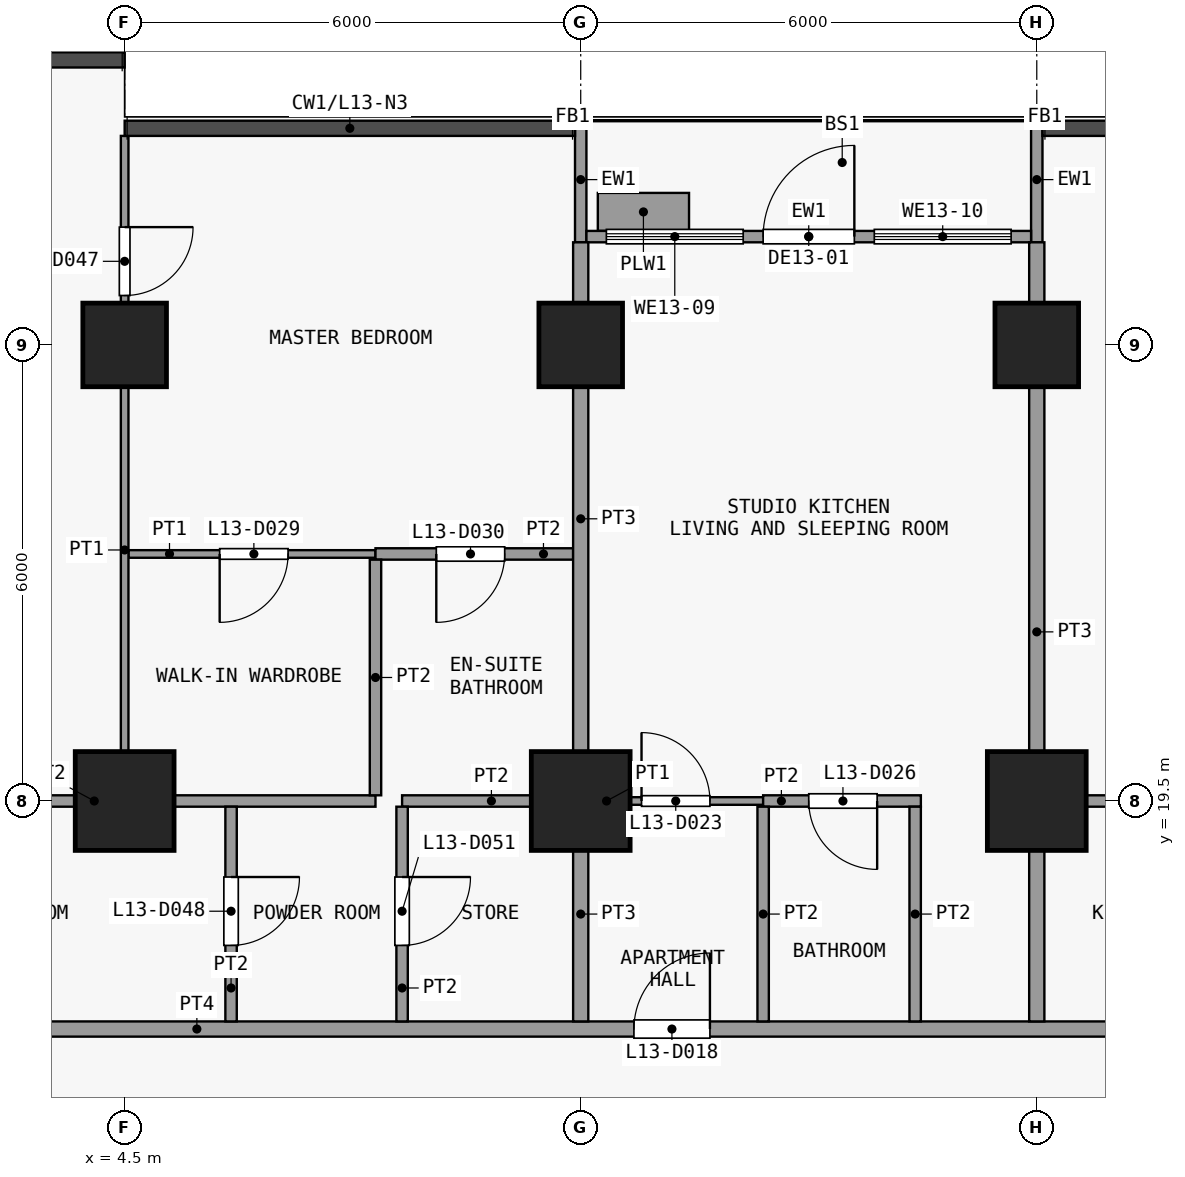
"""IFC4 building model, lengths in metres.
Left out: names, types, materials, properties, quantities, classifications, styles, units other than length and angle.
Written with IfcOpenShell. Run it as: python <this file> out.ifc"""

import sys

from ifc_helpers import new_model, si_unit, direction, frame, frame_2d, origin, origin_2d, place, context, subcontext, project, spatial, rectangle, extrude, element, fill, save


model = new_model("IFC4")
c1 = context("Model", 3, precision=1e-05, world=origin(), true_north=direction((0.0, 1.0)))
c2 = subcontext(c1, "Body", "Model", "MODEL_VIEW")
j1 = project(units=[si_unit("LENGTHUNIT", "METRE"), si_unit("PLANEANGLEUNIT", "RADIAN")], contexts=[c1])
p1 = place(None, origin())
s1 = spatial("IfcSite", under=j1, at=p1, CompositionType="ELEMENT")
p2 = place(p1, origin())
s2 = spatial("IfcBuilding", under=s1, at=p2, CompositionType="ELEMENT")
p3 = place(p2, frame((0.0, 0.0, 57.7)))
s3 = spatial("IfcBuildingStorey", under=s2, at=p3, CompositionType="ELEMENT", Elevation=57.7)
p4 = place(p3, frame((4.5, 19.5, 0.0), z_axis=(0.0, 0.0, 1.0), x_axis=(1.0, 0.0, 0.0)))
e1 = element("IfcColumn", 1, at=p4, inside=s3, PredefinedType="COLUMN", context=c2, shape_type="SweptSolid", body=[
    extrude(rectangle(XDim=1.3, YDim=1.3, at=origin_2d()), origin(), (0.0, 0.0, 1.0), 3.6),
])
p5 = place(p3, frame((4.5, 25.5, 0.0), z_axis=(0.0, 0.0, 1.0), x_axis=(1.0, 0.0, 0.0)))
e2 = element("IfcColumn", 2, at=p5, inside=s3, PredefinedType="COLUMN", context=c2, shape_type="SweptSolid", body=[
    extrude(rectangle(XDim=1.1, YDim=1.1, at=origin_2d()), origin(), (0.0, 0.0, 1.0), 3.6),
])
p6 = place(p3, frame((10.5, 19.5, 0.0), z_axis=(0.0, 0.0, 1.0), x_axis=(1.0, 0.0, 0.0)))
e3 = element("IfcColumn", 3, at=p6, inside=s3, PredefinedType="COLUMN", context=c2, shape_type="SweptSolid", body=[
    extrude(rectangle(XDim=1.3, YDim=1.3, at=origin_2d()), origin(), (0.0, 0.0, 1.0), 3.6),
])
p7 = place(p3, frame((10.5, 25.5, 0.0), z_axis=(0.0, 0.0, 1.0), x_axis=(1.0, 0.0, 0.0)))
e4 = element("IfcColumn", 4, at=p7, inside=s3, PredefinedType="COLUMN", context=c2, shape_type="SweptSolid", body=[
    extrude(rectangle(XDim=1.1, YDim=1.1, at=origin_2d()), origin(), (0.0, 0.0, 1.0), 3.6),
])
p8 = place(p3, frame((16.5, 19.5, 0.0), z_axis=(0.0, 0.0, 1.0), x_axis=(1.0, 0.0, 0.0)))
e5 = element("IfcColumn", 5, at=p8, inside=s3, PredefinedType="COLUMN", context=c2, shape_type="SweptSolid", body=[
    extrude(rectangle(XDim=1.3, YDim=1.3, at=origin_2d()), origin(), (0.0, 0.0, 1.0), 3.6),
])
p9 = place(p3, frame((16.5, 25.5, 0.0), z_axis=(0.0, 0.0, 1.0), x_axis=(1.0, 0.0, 0.0)))
e6 = element("IfcColumn", 6, at=p9, inside=s3, PredefinedType="COLUMN", context=c2, shape_type="SweptSolid", body=[
    extrude(rectangle(XDim=1.1, YDim=1.1, at=origin_2d()), origin(), (0.0, 0.0, 1.0), 3.6),
])
for number, where, z_axis, x_axis in (
    (7, (10.5, 26.85, 0.0), (0.0, 0.0, 1.0), (0.0, 1.0, 0.0)),
    (8, (16.5, 26.85, 0.0), (0.0, 0.0, 1.0), (0.0, 1.0, 0.0)),
):
    element("IfcWall", number, at=place(p3, frame(where, z_axis=z_axis, x_axis=x_axis)), inside=s3, PredefinedType="SOLIDWALL", context=c2, shape_type="SweptSolid", body=[
        extrude(rectangle(XDim=1.65, YDim=0.15, at=frame_2d((0.825, 0.0))), origin(), (0.0, 0.0, 1.0), 3.3),
    ])
p10 = place(p3, frame((10.575, 26.925, 0.0), z_axis=(0.0, 0.0, 1.0), x_axis=(1.0, 0.0, 0.0)))
e9 = element("IfcWall", 9, at=p10, inside=s3, PredefinedType="SOLIDWALL", context=c2, shape_type="SweptSolid", body=[
    extrude(rectangle(XDim=5.85, YDim=0.15, at=frame_2d((2.925, 0.0))), origin(), (0.0, 0.0, 1.0), 3.3),
])
p11 = place(p10, frame((2.325, 0.0, 0.0)))
e10 = element("IfcOpeningElement", 10, at=p11, cuts=e9, PredefinedType="OPENING", context=c2, shape_type="SweptSolid", body=[
    extrude(rectangle(XDim=1.2, YDim=2.4, at=frame_2d((0.6, 1.2))), frame((0.0, 0.085, 0.0), z_axis=(0.0, -1.0, 0.0), x_axis=(1.0, 0.0, 0.0)), (0.0, 0.0, 1.0), 0.17),
])
p12 = place(p10, frame((0.262, 0.0, 0.9)))
e11 = element("IfcOpeningElement", 11, at=p12, cuts=e9, PredefinedType="OPENING", context=c2, shape_type="SweptSolid", body=[
    extrude(rectangle(XDim=1.8, YDim=2.1, at=frame_2d((0.9, 1.05))), frame((0.0, 0.085, 0.0), z_axis=(0.0, -1.0, 0.0), x_axis=(1.0, 0.0, 0.0)), (0.0, 0.0, 1.0), 0.17),
])
p13 = place(p10, frame((3.788, 0.0, 0.9)))
e12 = element("IfcOpeningElement", 12, at=p13, cuts=e9, PredefinedType="OPENING", context=c2, shape_type="SweptSolid", body=[
    extrude(rectangle(XDim=1.8, YDim=2.1, at=frame_2d((0.9, 1.05))), frame((0.0, 0.085, 0.0), z_axis=(0.0, -1.0, 0.0), x_axis=(1.0, 0.0, 0.0)), (0.0, 0.0, 1.0), 0.17),
])
p14 = place(p3, frame((10.725, 27.25, 0.0), z_axis=(0.0, 0.0, 1.0), x_axis=(1.0, 0.0, 0.0)))
e13 = element("IfcWall", 13, at=p14, inside=s3, PredefinedType="USERDEFINED", context=c2, shape_type="SweptSolid", body=[
    extrude(rectangle(XDim=1.2, YDim=0.5, at=frame_2d((0.6, 0.0))), origin(), (0.0, 0.0, 1.0), 0.9),
])
p15 = place(p3, frame((-25.35, 16.5, 0.0), z_axis=(0.0, 0.0, 1.0), x_axis=(1.0, 0.0, 0.0)))
e14 = element("IfcWall", 14, at=p15, inside=s3, PredefinedType="PARTITIONING", context=c2, shape_type="SweptSolid", body=[
    extrude(rectangle(XDim=50.7, YDim=0.2, at=frame_2d((25.35, 0.0))), origin(), (0.0, 0.0, 1.0), 3.3),
])
p16 = place(p15, frame((7.05, 0.0, 0.0)))
e15 = element("IfcOpeningElement", 15, at=p16, cuts=e14, PredefinedType="OPENING", context=c2, shape_type="SweptSolid", body=[
    extrude(rectangle(XDim=1.0, YDim=2.1, at=frame_2d((0.5, 1.05))), frame((0.0, 0.11, 0.0), z_axis=(0.0, -1.0, 0.0), x_axis=(1.0, 0.0, 0.0)), (0.0, 0.0, 1.0), 0.22),
])
p17 = place(p15, frame((15.55, 0.0, 0.0)))
e16 = element("IfcOpeningElement", 16, at=p17, cuts=e14, PredefinedType="OPENING", context=c2, shape_type="SweptSolid", body=[
    extrude(rectangle(XDim=1.0, YDim=2.1, at=frame_2d((0.5, 1.05))), frame((0.0, 0.11, 0.0), z_axis=(0.0, -1.0, 0.0), x_axis=(1.0, 0.0, 0.0)), (0.0, 0.0, 1.0), 0.22),
])
p18 = place(p15, frame((24.05, 0.0, 0.0)))
e17 = element("IfcOpeningElement", 17, at=p18, cuts=e14, PredefinedType="OPENING", context=c2, shape_type="SweptSolid", body=[
    extrude(rectangle(XDim=1.0, YDim=2.1, at=frame_2d((0.5, 1.05))), frame((0.0, 0.11, 0.0), z_axis=(0.0, -1.0, 0.0), x_axis=(1.0, 0.0, 0.0)), (0.0, 0.0, 1.0), 0.22),
])
p19 = place(p15, frame((36.55, 0.0, 0.0)))
e18 = element("IfcOpeningElement", 18, at=p19, cuts=e14, PredefinedType="OPENING", context=c2, shape_type="SweptSolid", body=[
    extrude(rectangle(XDim=1.0, YDim=2.1, at=frame_2d((0.5, 1.05))), frame((0.0, 0.11, 0.0), z_axis=(0.0, -1.0, 0.0), x_axis=(1.0, 0.0, 0.0)), (0.0, 0.0, 1.0), 0.22),
])
p20 = place(p15, frame((45.05, 0.0, 0.0)))
e19 = element("IfcOpeningElement", 19, at=p20, cuts=e14, PredefinedType="OPENING", context=c2, shape_type="SweptSolid", body=[
    extrude(rectangle(XDim=1.0, YDim=2.1, at=frame_2d((0.5, 1.05))), frame((0.0, 0.11, 0.0), z_axis=(0.0, -1.0, 0.0), x_axis=(1.0, 0.0, 0.0)), (0.0, 0.0, 1.0), 0.22),
])
p21 = place(p3, frame((10.5, 19.5, 0.0), z_axis=(0.0, 0.0, 1.0), x_axis=(1.0, 0.0, 0.0)))
e20 = element("IfcWall", 20, at=p21, inside=s3, PredefinedType="PARTITIONING", context=c2, shape_type="SweptSolid", body=[
    extrude(rectangle(XDim=2.4, YDim=0.1, at=frame_2d((1.2, 0.0))), origin(), (0.0, 0.0, 1.0), 3.3),
])
p22 = place(p21, frame((0.8, 0.0, 0.0)))
e21 = element("IfcOpeningElement", 21, at=p22, cuts=e20, PredefinedType="OPENING", context=c2, shape_type="SweptSolid", body=[
    extrude(rectangle(XDim=0.9, YDim=2.1, at=frame_2d((0.45, 1.05))), frame((0.0, 0.06, 0.0), z_axis=(0.0, -1.0, 0.0), x_axis=(1.0, 0.0, 0.0)), (0.0, 0.0, 1.0), 0.12),
])
p23 = place(p3, frame((0.4, 19.5, 0.0), z_axis=(0.0, 0.0, 1.0), x_axis=(1.0, 0.0, 0.0)))
e22 = element("IfcWall", 22, at=p23, inside=s3, PredefinedType="PARTITIONING", context=c2, shape_type="SweptSolid", body=[
    extrude(rectangle(XDim=7.4, YDim=0.15, at=frame_2d((3.7, 0.0))), origin(), (0.0, 0.0, 1.0), 3.3),
])
p24 = place(p3, frame((8.15, 19.5, 0.0), z_axis=(0.0, 0.0, 1.0), x_axis=(1.0, 0.0, 0.0)))
e23 = element("IfcWall", 23, at=p24, inside=s3, PredefinedType="PARTITIONING", context=c2, shape_type="SweptSolid", body=[
    extrude(rectangle(XDim=2.35, YDim=0.15, at=frame_2d((1.175, 0.0))), origin(), (0.0, 0.0, 1.0), 3.3),
])
p25 = place(p3, frame((12.9, 19.5, 0.0), z_axis=(0.0, 0.0, 1.0), x_axis=(1.0, 0.0, 0.0)))
e24 = element("IfcWall", 24, at=p25, inside=s3, PredefinedType="PARTITIONING", context=c2, shape_type="SweptSolid", body=[
    extrude(rectangle(XDim=2.075, YDim=0.15, at=frame_2d((1.038, 0.0))), origin(), (0.0, 0.0, 1.0), 3.3),
])
p26 = place(p25, frame((0.6, 0.0, 0.0)))
e25 = element("IfcOpeningElement", 25, at=p26, cuts=e24, PredefinedType="OPENING", context=c2, shape_type="SweptSolid", body=[
    extrude(rectangle(XDim=0.9, YDim=2.1, at=frame_2d((0.45, 1.05))), frame((0.0, 0.085, 0.0), z_axis=(0.0, -1.0, 0.0), x_axis=(1.0, 0.0, 0.0)), (0.0, 0.0, 1.0), 0.17),
])
p27 = place(p3, frame((16.6, 19.5, 0.0), z_axis=(0.0, 0.0, 1.0), x_axis=(1.0, 0.0, 0.0)))
e26 = element("IfcWall", 26, at=p27, inside=s3, PredefinedType="PARTITIONING", context=c2, shape_type="SweptSolid", body=[
    extrude(rectangle(XDim=2.4, YDim=0.15, at=frame_2d((1.2, 0.0))), origin(), (0.0, 0.0, 1.0), 3.3),
])
p28 = place(p3, frame((4.55, 22.75, 0.0), z_axis=(0.0, 0.0, 1.0), x_axis=(1.0, 0.0, 0.0)))
e27 = element("IfcWall", 27, at=p28, inside=s3, PredefinedType="PARTITIONING", context=c2, shape_type="SweptSolid", body=[
    extrude(rectangle(XDim=3.25, YDim=0.1, at=frame_2d((1.625, 0.0))), origin(), (0.0, 0.0, 1.0), 3.3),
])
p29 = place(p28, frame((1.2, 0.0, 0.0)))
e28 = element("IfcOpeningElement", 28, at=p29, cuts=e27, PredefinedType="OPENING", context=c2, shape_type="SweptSolid", body=[
    extrude(rectangle(XDim=0.9, YDim=2.1, at=frame_2d((0.45, 1.05))), frame((0.0, 0.06, 0.0), z_axis=(0.0, -1.0, 0.0), x_axis=(1.0, 0.0, 0.0)), (0.0, 0.0, 1.0), 0.12),
])
p30 = place(p3, frame((7.8, 22.75, 0.0), z_axis=(0.0, 0.0, 1.0), x_axis=(1.0, 0.0, 0.0)))
e29 = element("IfcWall", 29, at=p30, inside=s3, PredefinedType="PARTITIONING", context=c2, shape_type="SweptSolid", body=[
    extrude(rectangle(XDim=2.6, YDim=0.15, at=frame_2d((1.3, 0.0))), origin(), (0.0, 0.0, 1.0), 3.3),
])
p31 = place(p30, frame((0.8, 0.0, 0.0)))
e30 = element("IfcOpeningElement", 30, at=p31, cuts=e29, PredefinedType="OPENING", context=c2, shape_type="SweptSolid", body=[
    extrude(rectangle(XDim=0.9, YDim=2.1, at=frame_2d((0.45, 1.05))), frame((0.0, 0.085, 0.0), z_axis=(0.0, -1.0, 0.0), x_axis=(1.0, 0.0, 0.0)), (0.0, 0.0, 1.0), 0.17),
])
p32 = place(p3, frame((4.5, 19.575, 0.0), z_axis=(0.0, 0.0, 1.0), x_axis=(0.0, 1.0, 0.0)))
e31 = element("IfcWall", 31, at=p32, inside=s3, PredefinedType="PARTITIONING", context=c2, shape_type="SweptSolid", body=[
    extrude(rectangle(XDim=8.675, YDim=0.1, at=frame_2d((4.337, 0.0))), origin(), (0.0, 0.0, 1.0), 3.3),
])
p33 = place(p32, frame((6.575, 0.0, 0.0)))
e32 = element("IfcOpeningElement", 32, at=p33, cuts=e31, PredefinedType="OPENING", context=c2, shape_type="SweptSolid", body=[
    extrude(rectangle(XDim=0.9, YDim=2.1, at=frame_2d((0.45, 1.05))), frame((0.0, 0.06, 0.0), z_axis=(0.0, -1.0, 0.0), x_axis=(1.0, 0.0, 0.0)), (0.0, 0.0, 1.0), 0.12),
])
p34 = place(p3, frame((5.9, 16.6, 0.0), z_axis=(0.0, 0.0, 1.0), x_axis=(0.0, 1.0, 0.0)))
e33 = element("IfcWall", 33, at=p34, inside=s3, PredefinedType="PARTITIONING", context=c2, shape_type="SweptSolid", body=[
    extrude(rectangle(XDim=2.825, YDim=0.15, at=frame_2d((1.413, 0.0))), origin(), (0.0, 0.0, 1.0), 3.3),
])
p35 = place(p34, frame((1.0, 0.0, 0.0)))
e34 = element("IfcOpeningElement", 34, at=p35, cuts=e33, PredefinedType="OPENING", context=c2, shape_type="SweptSolid", body=[
    extrude(rectangle(XDim=0.9, YDim=2.1, at=frame_2d((0.45, 1.05))), frame((0.0, 0.085, 0.0), z_axis=(0.0, -1.0, 0.0), x_axis=(1.0, 0.0, 0.0)), (0.0, 0.0, 1.0), 0.17),
])
p36 = place(p3, frame((7.8, 19.575, 0.0), z_axis=(0.0, 0.0, 1.0), x_axis=(0.0, 1.0, 0.0)))
e35 = element("IfcWall", 35, at=p36, inside=s3, PredefinedType="PARTITIONING", context=c2, shape_type="SweptSolid", body=[
    extrude(rectangle(XDim=3.1, YDim=0.15, at=frame_2d((1.55, 0.0))), origin(), (0.0, 0.0, 1.0), 3.3),
])
p37 = place(p3, frame((8.15, 16.6, 0.0), z_axis=(0.0, 0.0, 1.0), x_axis=(0.0, 1.0, 0.0)))
e36 = element("IfcWall", 36, at=p37, inside=s3, PredefinedType="PARTITIONING", context=c2, shape_type="SweptSolid", body=[
    extrude(rectangle(XDim=2.825, YDim=0.15, at=frame_2d((1.413, 0.0))), origin(), (0.0, 0.0, 1.0), 3.3),
])
p38 = place(p37, frame((1.0, 0.0, 0.0)))
e37 = element("IfcOpeningElement", 37, at=p38, cuts=e36, PredefinedType="OPENING", context=c2, shape_type="SweptSolid", body=[
    extrude(rectangle(XDim=0.9, YDim=2.1, at=frame_2d((0.45, 1.05))), frame((0.0, 0.085, 0.0), z_axis=(0.0, -1.0, 0.0), x_axis=(1.0, 0.0, 0.0)), (0.0, 0.0, 1.0), 0.17),
])
p39 = place(p3, frame((10.5, 16.6, 0.0), z_axis=(0.0, 0.0, 1.0), x_axis=(0.0, 1.0, 0.0)))
e38 = element("IfcWall", 38, at=p39, inside=s3, PredefinedType="PARTITIONING", context=c2, shape_type="SweptSolid", body=[
    extrude(rectangle(XDim=2.825, YDim=0.2, at=frame_2d((1.413, 0.0))), origin(), (0.0, 0.0, 1.0), 3.3),
])
p40 = place(p3, frame((10.5, 19.575, 0.0), z_axis=(0.0, 0.0, 1.0), x_axis=(0.0, 1.0, 0.0)))
e39 = element("IfcWall", 39, at=p40, inside=s3, PredefinedType="PARTITIONING", context=c2, shape_type="SweptSolid", body=[
    extrude(rectangle(XDim=7.275, YDim=0.2, at=frame_2d((3.638, 0.0))), origin(), (0.0, 0.0, 1.0), 3.3),
])
for number, where, z_axis, x_axis in (
    (40, (12.9, 16.6, 0.0), (0.0, 0.0, 1.0), (0.0, 1.0, 0.0)),
    (41, (14.9, 16.6, 0.0), (0.0, 0.0, 1.0), (0.0, 1.0, 0.0)),
):
    element("IfcWall", number, at=place(p3, frame(where, z_axis=z_axis, x_axis=x_axis)), inside=s3, PredefinedType="PARTITIONING", context=c2, shape_type="SweptSolid", body=[
        extrude(rectangle(XDim=2.825, YDim=0.15, at=frame_2d((1.413, 0.0))), origin(), (0.0, 0.0, 1.0), 3.3),
    ])
p41 = place(p3, frame((16.5, 16.6, 0.0), z_axis=(0.0, 0.0, 1.0), x_axis=(0.0, 1.0, 0.0)))
e42 = element("IfcWall", 42, at=p41, inside=s3, PredefinedType="PARTITIONING", context=c2, shape_type="SweptSolid", body=[
    extrude(rectangle(XDim=10.25, YDim=0.2, at=frame_2d((5.125, 0.0))), origin(), (0.0, 0.0, 1.0), 3.3),
])
p42 = place(p11, origin())
e43 = element("IfcDoor", 43, at=p42, inside=s3, OperationType="SINGLE_SWING_RIGHT", PredefinedType="DOOR", context=c2, shape_type="SweptSolid", body=[
    extrude(rectangle(XDim=1.2, YDim=2.4, at=frame_2d((0.6, 1.2))), frame((0.0, 0.025, 0.0), z_axis=(0.0, -1.0, 0.0), x_axis=(1.0, 0.0, 0.0)), (0.0, 0.0, 1.0), 0.05),
])
fill(e10, e43)
p43 = place(p12, origin())
e44 = element("IfcWindow", 44, at=p43, inside=s3, PartitioningType="SINGLE_PANEL", PredefinedType="WINDOW", context=c2, shape_type="SweptSolid", body=[
    extrude(rectangle(XDim=1.8, YDim=2.1, at=frame_2d((0.9, 1.05))), frame((0.0, 0.03, 0.0), z_axis=(0.0, -1.0, 0.0), x_axis=(1.0, 0.0, 0.0)), (0.0, 0.0, 1.0), 0.06),
])
fill(e11, e44)
p44 = place(p13, origin())
e45 = element("IfcWindow", 45, at=p44, inside=s3, PartitioningType="SINGLE_PANEL", PredefinedType="WINDOW", context=c2, shape_type="SweptSolid", body=[
    extrude(rectangle(XDim=1.8, YDim=2.1, at=frame_2d((0.9, 1.05))), frame((0.0, 0.03, 0.0), z_axis=(0.0, -1.0, 0.0), x_axis=(1.0, 0.0, 0.0)), (0.0, 0.0, 1.0), 0.06),
])
fill(e12, e45)
p45 = place(p19, origin())
e46 = element("IfcDoor", 46, at=p45, inside=s3, OperationType="SINGLE_SWING_LEFT", PredefinedType="DOOR", context=c2, shape_type="SweptSolid", body=[
    extrude(rectangle(XDim=1.0, YDim=2.1, at=frame_2d((0.5, 1.05))), frame((0.0, 0.025, 0.0), z_axis=(0.0, -1.0, 0.0), x_axis=(1.0, 0.0, 0.0)), (0.0, 0.0, 1.0), 0.05),
])
fill(e18, e46)
p46 = place(p22, origin())
e47 = element("IfcDoor", 47, at=p46, inside=s3, OperationType="SINGLE_SWING_RIGHT", PredefinedType="DOOR", context=c2, shape_type="SweptSolid", body=[
    extrude(rectangle(XDim=0.9, YDim=2.1, at=frame_2d((0.45, 1.05))), frame((0.0, 0.025, 0.0), z_axis=(0.0, -1.0, 0.0), x_axis=(1.0, 0.0, 0.0)), (0.0, 0.0, 1.0), 0.05),
])
fill(e21, e47)
p47 = place(p26, origin())
e48 = element("IfcDoor", 48, at=p47, inside=s3, OperationType="SINGLE_SWING_RIGHT", PredefinedType="DOOR", context=c2, shape_type="SweptSolid", body=[
    extrude(rectangle(XDim=0.9, YDim=2.1, at=frame_2d((0.45, 1.05))), frame((0.0, 0.025, 0.0), z_axis=(0.0, -1.0, 0.0), x_axis=(1.0, 0.0, 0.0)), (0.0, 0.0, 1.0), 0.05),
])
fill(e25, e48)
p48 = place(p29, origin())
e49 = element("IfcDoor", 49, at=p48, inside=s3, OperationType="SINGLE_SWING_LEFT", PredefinedType="DOOR", context=c2, shape_type="SweptSolid", body=[
    extrude(rectangle(XDim=0.9, YDim=2.1, at=frame_2d((0.45, 1.05))), frame((0.0, 0.025, 0.0), z_axis=(0.0, -1.0, 0.0), x_axis=(1.0, 0.0, 0.0)), (0.0, 0.0, 1.0), 0.05),
])
fill(e28, e49)
p49 = place(p31, origin())
e50 = element("IfcDoor", 50, at=p49, inside=s3, OperationType="SINGLE_SWING_LEFT", PredefinedType="DOOR", context=c2, shape_type="SweptSolid", body=[
    extrude(rectangle(XDim=0.9, YDim=2.1, at=frame_2d((0.45, 1.05))), frame((0.0, 0.025, 0.0), z_axis=(0.0, -1.0, 0.0), x_axis=(1.0, 0.0, 0.0)), (0.0, 0.0, 1.0), 0.05),
])
fill(e30, e50)
p50 = place(p33, origin())
e51 = element("IfcDoor", 51, at=p50, inside=s3, OperationType="SINGLE_SWING_RIGHT", PredefinedType="DOOR", context=c2, shape_type="SweptSolid", body=[
    extrude(rectangle(XDim=0.9, YDim=2.1, at=frame_2d((0.45, 1.05))), frame((0.0, 0.025, 0.0), z_axis=(0.0, -1.0, 0.0), x_axis=(1.0, 0.0, 0.0)), (0.0, 0.0, 1.0), 0.05),
])
fill(e32, e51)
p51 = place(p35, origin())
e52 = element("IfcDoor", 52, at=p51, inside=s3, OperationType="SINGLE_SWING_RIGHT", PredefinedType="DOOR", context=c2, shape_type="SweptSolid", body=[
    extrude(rectangle(XDim=0.9, YDim=2.1, at=frame_2d((0.45, 1.05))), frame((0.0, 0.025, 0.0), z_axis=(0.0, -1.0, 0.0), x_axis=(1.0, 0.0, 0.0)), (0.0, 0.0, 1.0), 0.05),
])
fill(e34, e52)
p52 = place(p38, origin())
e53 = element("IfcDoor", 53, at=p52, inside=s3, OperationType="SINGLE_SWING_RIGHT", PredefinedType="DOOR", context=c2, shape_type="SweptSolid", body=[
    extrude(rectangle(XDim=0.9, YDim=2.1, at=frame_2d((0.45, 1.05))), frame((0.0, 0.025, 0.0), z_axis=(0.0, -1.0, 0.0), x_axis=(1.0, 0.0, 0.0)), (0.0, 0.0, 1.0), 0.05),
])
fill(e37, e53)
save(model, sys.argv[1])
